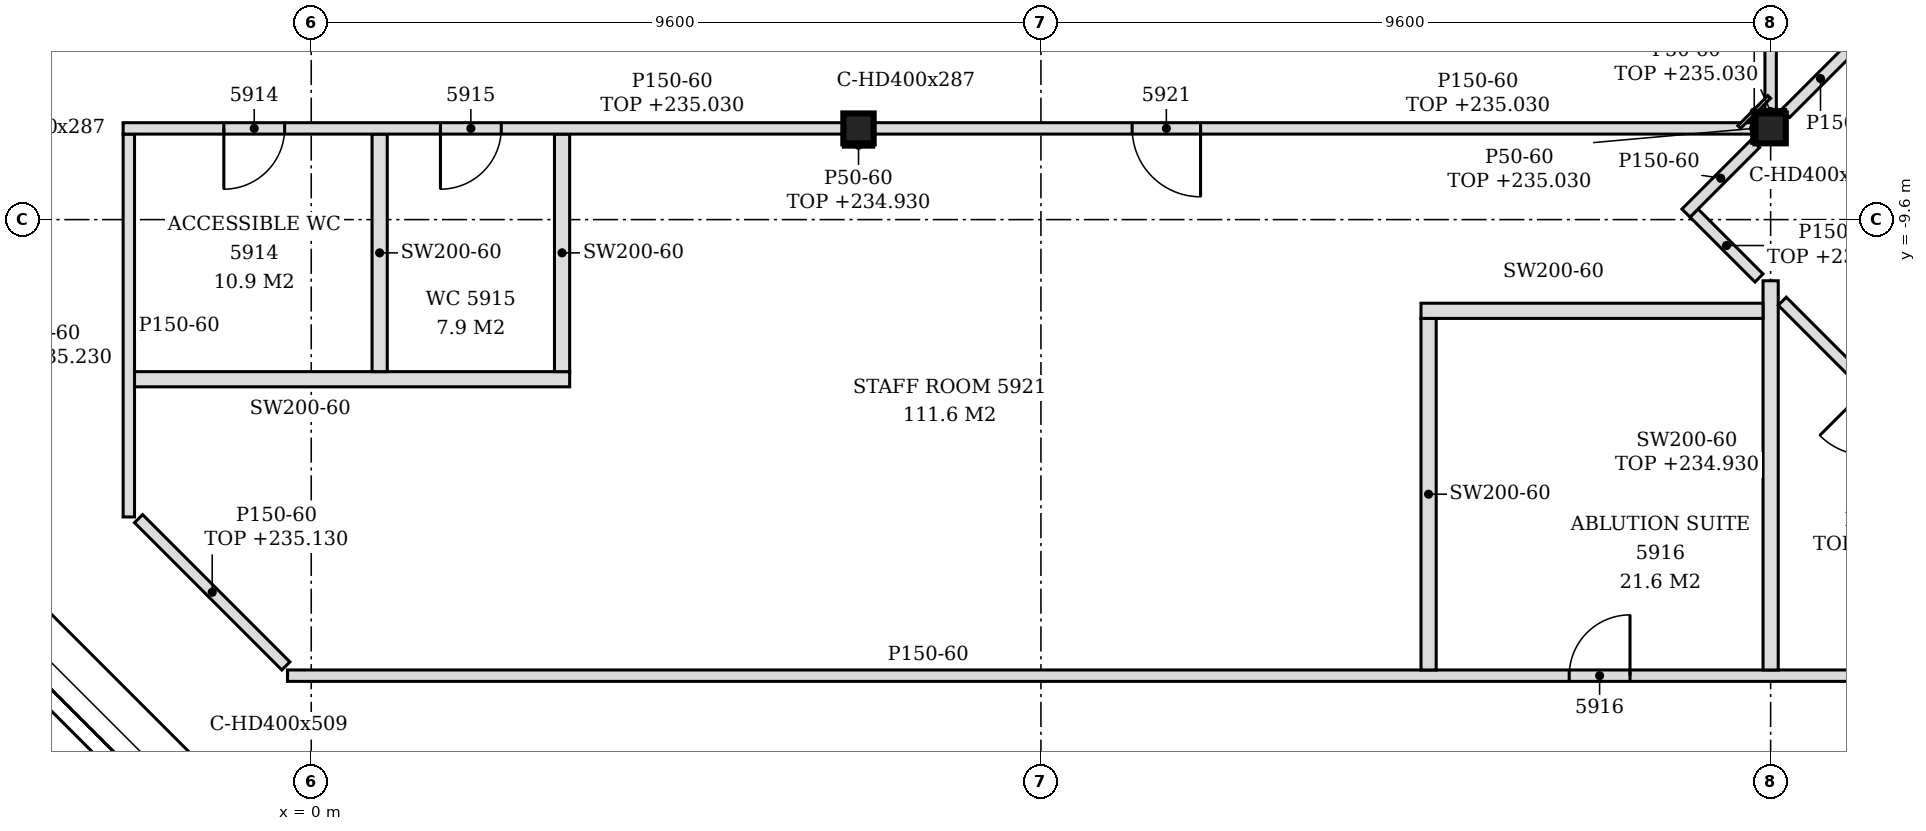
"""IFC4 building model, lengths in metres.
Left out: names, types, materials, properties, quantities, classifications, styles, units other than length and angle.
Written with IfcOpenShell. Run it as: python <this file> out.ifc"""

import sys

from ifc_helpers import new_model, si_unit, direction, frame, frame_2d, origin, origin_2d, place, context, subcontext, project, spatial, polyline, rectangle, i_section, outline, extrude, element, fill, save


model = new_model("IFC4")
c1 = context("Model", 3, precision=1e-05, world=origin(), true_north=direction((0.0, 1.0)))
c2 = subcontext(c1, "Body", "Model", "MODEL_VIEW")
j1 = project(units=[si_unit("LENGTHUNIT", "METRE"), si_unit("PLANEANGLEUNIT", "RADIAN")], contexts=[c1])
p1 = place(None, origin())
s1 = spatial("IfcSite", under=j1, at=p1, CompositionType="ELEMENT")
p2 = place(p1, origin())
s2 = spatial("IfcBuilding", under=s1, at=p2, CompositionType="ELEMENT")
p3 = place(p2, frame((0.0, 0.0, 232.2)))
s3 = spatial("IfcBuildingStorey", under=s2, at=p3, CompositionType="ELEMENT", Elevation=232.2)
for number, where, z_axis, x_axis in (
    (1, (7.2, -8.4, -0.15), (0.0, 0.0, 1.0), (1.0, 0.0, 0.0)),
    (2, (19.2, -8.4, -0.15), (0.0, 0.0, 1.0), (1.0, 0.0, 0.0)),
):
    element("IfcColumn", number, at=place(p3, frame(where, z_axis=z_axis, x_axis=x_axis)), inside=s3, PredefinedType="COLUMN", context=c2, shape_type="SweptSolid", body=[
        extrude(i_section(OverallWidth=0.399, OverallDepth=0.393, WebThickness=0.023, FlangeThickness=0.037, FilletRadius=0.015, at=origin_2d()), origin(), (0.0, 0.0, 1.0), 3.6),
    ])
p4 = place(p3, frame((-0.312, -15.6, 0.0), z_axis=(0.0, 0.0, 1.0), x_axis=(1.0, 0.0, 0.0)))
e3 = element("IfcWall", 3, at=p4, inside=s3, PredefinedType="PARTITIONING", context=c2, shape_type="SweptSolid", body=[
    extrude(outline(polyline([(0.0, 0.0), (20.939, 0.0), (20.939, 3.45), (19.662, 3.45), (19.66, 2.73), (19.362, 2.73), (19.36, 3.45), (7.662, 3.45), (7.66, 2.73), (7.362, 2.73), (7.36, 3.45), (0.0, 3.45), (0.0, 0.0)])), frame((0.0, 0.075, 0.0), z_axis=(0.0, -1.0, 0.0), x_axis=(1.0, 0.0, 0.0)), (0.0, 0.0, 1.0), 0.15),
])
p5 = place(p4, frame((16.862, 0.0, 0.0)))
e4 = element("IfcOpeningElement", 4, at=p5, cuts=e3, PredefinedType="OPENING", context=c2, shape_type="SweptSolid", body=[
    extrude(rectangle(XDim=0.8, YDim=2.1, at=frame_2d((0.4, 1.05))), frame((0.0, 0.085, 0.0), z_axis=(0.0, -1.0, 0.0), x_axis=(1.0, 0.0, 0.0)), (0.0, 0.0, 1.0), 0.17),
])
p6 = place(p3, frame((-0.334, -15.472, 0.0), z_axis=(0.0, 0.0, 1.0), x_axis=(-0.707106781187, 0.707106781187, 0.0)))
e5 = element("IfcWall", 5, at=p6, inside=s3, PredefinedType="PARTITIONING", context=c2, shape_type="SweptSolid", body=[
    extrude(rectangle(XDim=2.741, YDim=0.15, at=frame_2d((1.37, 0.0))), origin(), (0.0, 0.0, 1.0), 2.93),
])
p7 = place(p3, frame((14.7, -15.525, 0.0), z_axis=(0.0, 0.0, 1.0), x_axis=(0.0, 1.0, 0.0)))
e6 = element("IfcWall", 6, at=p7, inside=s3, PredefinedType="PARTITIONING", context=c2, shape_type="SweptSolid", body=[
    extrude(outline(polyline([(0.0, 0.0), (4.625, 0.0), (4.625, 3.45), (1.23, 3.45), (1.228, 2.88), (1.02, 2.88), (1.018, 3.45), (0.0, 3.45), (0.0, 0.0)])), frame((0.0, 0.1, 0.0), z_axis=(0.0, -1.0, 0.0), x_axis=(1.0, 0.0, 0.0)), (0.0, 0.0, 1.0), 0.2),
])
p8 = place(p3, frame((19.2, -15.525, 0.0), z_axis=(0.0, 0.0, 1.0), x_axis=(0.0, 1.0, 0.0)))
e7 = element("IfcWall", 7, at=p8, inside=s3, PredefinedType="PARTITIONING", context=c2, shape_type="SweptSolid", body=[
    extrude(rectangle(XDim=5.12, YDim=0.2, at=frame_2d((2.56, 0.0))), origin(), (0.0, 0.0, 1.0), 2.73),
])
p9 = place(p3, frame((22.347, -13.668, 0.0), z_axis=(0.0, 0.0, 1.0), x_axis=(-0.707106781187, 0.707106781187, 0.0)))
e8 = element("IfcWall", 8, at=p9, inside=s3, PredefinedType="PARTITIONING", context=c2, shape_type="SweptSolid", body=[
    extrude(rectangle(XDim=4.234, YDim=0.15, at=frame_2d((2.117, 0.0))), origin(), (0.0, 0.0, 1.0), 2.73),
])
p10 = place(p9, frame((1.737, 0.0, 0.0)))
e9 = element("IfcOpeningElement", 9, at=p10, cuts=e8, PredefinedType="OPENING", context=c2, shape_type="SweptSolid", body=[
    extrude(rectangle(XDim=0.9, YDim=2.1, at=frame_2d((0.45, 1.05))), frame((0.0, 0.085, 0.0), z_axis=(0.0, -1.0, 0.0), x_axis=(1.0, 0.0, 0.0)), (0.0, 0.0, 1.0), 0.17),
])
p11 = place(p3, frame((-2.4, -13.512, 0.0), z_axis=(0.0, 0.0, 1.0), x_axis=(0.0, 1.0, 0.0)))
e10 = element("IfcWall", 10, at=p11, inside=s3, PredefinedType="PARTITIONING", context=c2, shape_type="SweptSolid", body=[
    extrude(outline(polyline([(0.0, 0.0), (5.037, 0.0), (5.037, 2.83), (4.962, 2.83), (4.96, 3.45), (0.0, 3.45), (0.0, 0.0)])), frame((0.0, 0.075, 0.0), z_axis=(0.0, -1.0, 0.0), x_axis=(1.0, 0.0, 0.0)), (0.0, 0.0, 1.0), 0.15),
])
p12 = place(p3, frame((-2.325, -11.7, 0.0), z_axis=(0.0, 0.0, 1.0), x_axis=(1.0, 0.0, 0.0)))
e11 = element("IfcWall", 11, at=p12, inside=s3, PredefinedType="PARTITIONING", context=c2, shape_type="SweptSolid", body=[
    extrude(rectangle(XDim=5.725, YDim=0.2, at=frame_2d((2.862, 0.0))), origin(), (0.0, 0.0, 1.0), 3.45),
])
for number, where, z_axis, x_axis in (
    (12, (0.9, -11.6, 0.0), (0.0, 0.0, 1.0), (0.0, 1.0, 0.0)),
    (13, (3.3, -11.6, 0.0), (0.0, 0.0, 1.0), (0.0, 1.0, 0.0)),
):
    element("IfcWall", number, at=place(p3, frame(where, z_axis=z_axis, x_axis=x_axis)), inside=s3, PredefinedType="PARTITIONING", context=c2, shape_type="SweptSolid", body=[
        extrude(outline(polyline([(0.0, 0.0), (3.125, 0.0), (3.125, 2.83), (3.05, 2.83), (3.048, 3.45), (0.0, 3.45), (0.0, 0.0)])), frame((0.0, 0.1, 0.0), z_axis=(0.0, -1.0, 0.0), x_axis=(1.0, 0.0, 0.0)), (0.0, 0.0, 1.0), 0.2),
    ])
p13 = place(p3, frame((14.6, -10.8, 0.0), z_axis=(0.0, 0.0, 1.0), x_axis=(1.0, 0.0, 0.0)))
e14 = element("IfcWall", 14, at=p13, inside=s3, PredefinedType="PARTITIONING", context=c2, shape_type="SweptSolid", body=[
    extrude(outline(polyline([(0.0, 0.0), (4.5, 0.0), (4.5, 2.73), (4.45, 2.73), (4.448, 3.45), (0.0, 3.45), (0.0, 0.0)])), frame((0.0, 0.1, 0.0), z_axis=(0.0, -1.0, 0.0), x_axis=(1.0, 0.0, 0.0)), (0.0, 0.0, 1.0), 0.2),
])
p14 = place(p3, frame((19.047, -10.368, 0.0), z_axis=(0.0, 0.0, 1.0), x_axis=(-0.707409718716, 0.706803713817, 0.0)))
e15 = element("IfcWall", 15, at=p14, inside=s3, PredefinedType="PARTITIONING", context=c2, shape_type="SweptSolid", body=[
    extrude(rectangle(XDim=1.208, YDim=0.15, at=frame_2d((0.604, 0.0))), origin(), (0.0, 0.0, 1.0), 2.73),
])
p15 = place(p3, frame((18.086, -9.514, 0.0), z_axis=(0.0, 0.0, 1.0), x_axis=(0.707106781187, 0.707106781187, 0.0)))
e16 = element("IfcWall", 16, at=p15, inside=s3, PredefinedType="PARTITIONING", context=c2, shape_type="SweptSolid", body=[
    extrude(rectangle(XDim=1.295, YDim=0.15, at=frame_2d((0.648, 0.0))), origin(), (0.0, 0.0, 1.0), 3.45),
])
p16 = place(p3, frame((-2.475, -8.4, 0.0), z_axis=(0.0, 0.0, 1.0), x_axis=(1.0, 0.0, 0.0)))
e17 = element("IfcWall", 17, at=p16, inside=s3, PredefinedType="PARTITIONING", context=c2, shape_type="SweptSolid", body=[
    extrude(rectangle(XDim=9.476, YDim=0.15, at=frame_2d((4.738, 0.0))), origin(), (0.0, 0.0, 1.0), 2.83),
])
p17 = place(p16, frame((1.325, 0.0, 0.0)))
e18 = element("IfcOpeningElement", 18, at=p17, cuts=e17, PredefinedType="OPENING", context=c2, shape_type="SweptSolid", body=[
    extrude(rectangle(XDim=0.8, YDim=2.1, at=frame_2d((0.4, 1.05))), frame((0.0, 0.085, 0.0), z_axis=(0.0, -1.0, 0.0), x_axis=(1.0, 0.0, 0.0)), (0.0, 0.0, 1.0), 0.17),
])
p18 = place(p16, frame((4.175, 0.0, 0.0)))
e19 = element("IfcOpeningElement", 19, at=p18, cuts=e17, PredefinedType="OPENING", context=c2, shape_type="SweptSolid", body=[
    extrude(rectangle(XDim=0.8, YDim=2.1, at=frame_2d((0.4, 1.05))), frame((0.0, 0.085, 0.0), z_axis=(0.0, -1.0, 0.0), x_axis=(1.0, 0.0, 0.0)), (0.0, 0.0, 1.0), 0.17),
])
p19 = place(p3, frame((7.399, -8.4, 0.0), z_axis=(0.0, 0.0, 1.0), x_axis=(1.0, 0.0, 0.0)))
e20 = element("IfcWall", 20, at=p19, inside=s3, PredefinedType="PARTITIONING", context=c2, shape_type="SweptSolid", body=[
    extrude(rectangle(XDim=11.601, YDim=0.15, at=frame_2d((5.801, 0.0))), origin(), (0.0, 0.0, 1.0), 2.83),
])
p20 = place(p19, frame((3.4, 0.0, 0.0)))
e21 = element("IfcOpeningElement", 21, at=p20, cuts=e20, PredefinedType="OPENING", context=c2, shape_type="SweptSolid", body=[
    extrude(rectangle(XDim=0.9, YDim=2.1, at=frame_2d((0.45, 1.05))), frame((0.0, 0.085, 0.0), z_axis=(0.0, -1.0, 0.0), x_axis=(1.0, 0.0, 0.0)), (0.0, 0.0, 1.0), 0.17),
])
p21 = place(p3, frame((19.2, -8.204, 0.0), z_axis=(0.0, 0.0, 1.0), x_axis=(0.0, 1.0, 0.0)))
e22 = element("IfcWall", 22, at=p21, inside=s3, PredefinedType="PARTITIONING", context=c2, shape_type="SweptSolid", body=[
    extrude(rectangle(XDim=4.529, YDim=0.15, at=frame_2d((2.264, 0.0))), origin(), (0.0, 0.0, 1.0), 2.83),
])
p22 = place(p3, frame((19.398, -8.202, 0.0), z_axis=(0.0, 0.0, 1.0), x_axis=(0.707200993001, 0.707012556818, 0.0)))
e23 = element("IfcWall", 23, at=p22, inside=s3, PredefinedType="PARTITIONING", context=c2, shape_type="SweptSolid", body=[
    extrude(rectangle(XDim=1.296, YDim=0.15, at=frame_2d((0.648, 0.0))), origin(), (0.0, 0.0, 1.0), 3.45),
])
p23 = place(p3, frame((18.786, -8.382, 0.0), z_axis=(0.0, 0.0, 1.0), x_axis=(0.707106781187, 0.707106781187, 0.0)))
e24 = element("IfcWall", 24, at=p23, inside=s3, PredefinedType="PARTITIONING", context=c2, shape_type="SweptSolid", body=[
    extrude(rectangle(XDim=0.56, YDim=0.05, at=frame_2d((0.28, 0.0))), origin(), (0.0, 0.0, 1.0), 2.83),
])
p24 = place(p3, frame((7.0, -8.622, 0.0), z_axis=(0.0, 0.0, 1.0), x_axis=(1.0, 0.0, 0.0)))
e25 = element("IfcWall", 25, at=p24, inside=s3, PredefinedType="PARTITIONING", context=c2, shape_type="SweptSolid", body=[
    extrude(rectangle(XDim=0.399, YDim=0.05, at=frame_2d((0.199, 0.0))), origin(), (0.0, 0.0, 1.0), 2.73),
])
p25 = place(p3, frame((19.0, -8.178, 0.0), z_axis=(0.0, 0.0, 1.0), x_axis=(1.0, 0.0, 0.0)))
e26 = element("IfcWall", 26, at=p25, inside=s3, PredefinedType="PARTITIONING", context=c2, shape_type="SweptSolid", body=[
    extrude(rectangle(XDim=0.399, YDim=0.05, at=frame_2d((0.199, 0.0))), origin(), (0.0, 0.0, 1.0), 2.83),
])
p26 = place(p3, frame((18.976, -8.596, 0.0), z_axis=(0.0, 0.0, 1.0), x_axis=(0.0, 1.0, 0.0)))
e27 = element("IfcWall", 27, at=p26, inside=s3, PredefinedType="PARTITIONING", context=c2, shape_type="SweptSolid", body=[
    extrude(rectangle(XDim=0.393, YDim=0.05, at=frame_2d((0.196, 0.0))), origin(), (0.0, 0.0, 1.0), 2.83),
])
p27 = place(p17, frame((0.8, 0.0, 0.0), z_axis=(0.0, 0.0, 1.0), x_axis=(-1.0, 0.0, 0.0)))
e28 = element("IfcDoor", 28, at=p27, inside=s3, OperationType="SINGLE_SWING_RIGHT", PredefinedType="DOOR", context=c2, shape_type="SweptSolid", body=[
    extrude(rectangle(XDim=0.8, YDim=2.1, at=frame_2d((0.4, 1.05))), frame((0.0, 0.025, 0.0), z_axis=(0.0, -1.0, 0.0), x_axis=(1.0, 0.0, 0.0)), (0.0, 0.0, 1.0), 0.05),
])
fill(e18, e28)
p28 = place(p18, frame((0.8, 0.0, 0.0), z_axis=(0.0, 0.0, 1.0), x_axis=(-1.0, 0.0, 0.0)))
e29 = element("IfcDoor", 29, at=p28, inside=s3, OperationType="SINGLE_SWING_RIGHT", PredefinedType="DOOR", context=c2, shape_type="SweptSolid", body=[
    extrude(rectangle(XDim=0.8, YDim=2.1, at=frame_2d((0.4, 1.05))), frame((0.0, 0.025, 0.0), z_axis=(0.0, -1.0, 0.0), x_axis=(1.0, 0.0, 0.0)), (0.0, 0.0, 1.0), 0.05),
])
fill(e19, e29)
p29 = place(p5, origin())
e30 = element("IfcDoor", 30, at=p29, inside=s3, OperationType="SINGLE_SWING_RIGHT", PredefinedType="DOOR", context=c2, shape_type="SweptSolid", body=[
    extrude(rectangle(XDim=0.8, YDim=2.1, at=frame_2d((0.4, 1.05))), frame((0.0, 0.025, 0.0), z_axis=(0.0, -1.0, 0.0), x_axis=(1.0, 0.0, 0.0)), (0.0, 0.0, 1.0), 0.05),
])
fill(e4, e30)
p30 = place(p20, frame((0.9, 0.0, 0.0), z_axis=(0.0, 0.0, 1.0), x_axis=(-1.0, 0.0, 0.0)))
e31 = element("IfcDoor", 31, at=p30, inside=s3, OperationType="SINGLE_SWING_LEFT", PredefinedType="DOOR", context=c2, shape_type="SweptSolid", body=[
    extrude(rectangle(XDim=0.9, YDim=2.1, at=frame_2d((0.45, 1.05))), frame((0.0, 0.025, 0.0), z_axis=(0.0, -1.0, 0.0), x_axis=(1.0, 0.0, 0.0)), (0.0, 0.0, 1.0), 0.05),
])
fill(e21, e31)
save(model, sys.argv[1])
